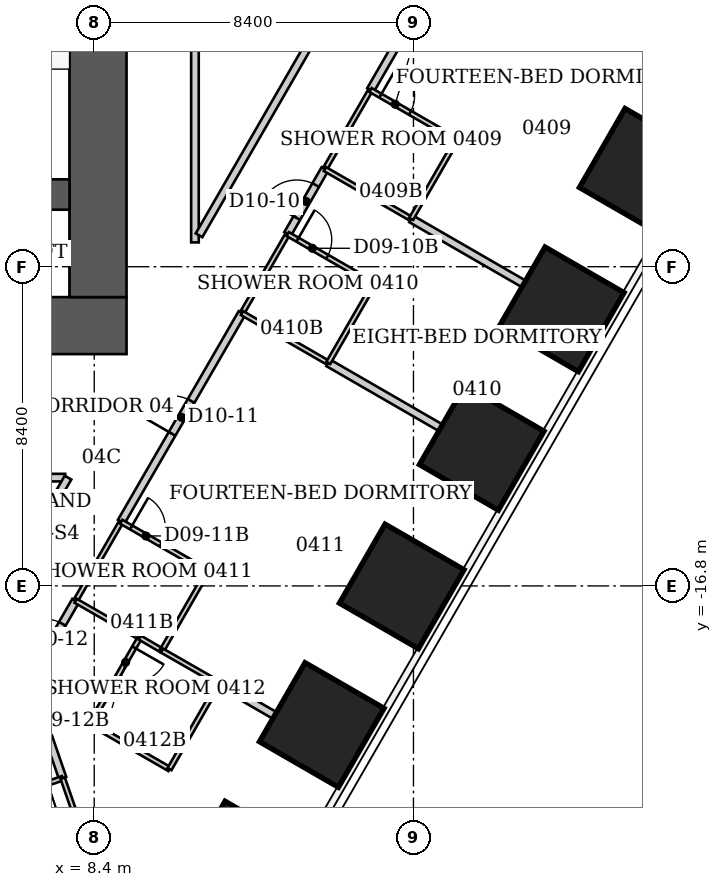
"""IFC4 building model, lengths in metres.
Left out: names, types, materials, properties, quantities, classifications, styles, units other than length and angle.
Written with IfcOpenShell. Run it as: python <this file> out.ifc"""

import sys

from ifc_helpers import new_model, si_unit, direction, frame, frame_2d, origin, origin_2d, place, context, subcontext, project, spatial, rectangle, extrude, element, fill, save


model = new_model("IFC4")
c1 = context("Model", 3, precision=1e-05, world=origin(), true_north=direction((0.0, 1.0)))
c2 = subcontext(c1, "Body", "Model", "MODEL_VIEW")
j1 = project(units=[si_unit("LENGTHUNIT", "METRE"), si_unit("PLANEANGLEUNIT", "RADIAN")], contexts=[c1])
p1 = place(None, origin())
s1 = spatial("IfcSite", under=j1, at=p1, CompositionType="ELEMENT")
p2 = place(p1, origin())
s2 = spatial("IfcBuilding", under=s1, at=p2, CompositionType="ELEMENT")
p3 = place(p2, frame((0.0, 0.0, 23.0)))
s3 = spatial("IfcBuildingStorey", under=s2, at=p3, CompositionType="ELEMENT", Elevation=23.0)
for number, where, z_axis, x_axis in (
    (1, (22.806, -5.875, 0.0), (0.0, 0.0, 1.0), (0.866, -0.5, 0.0)),
    (2, (20.701, -9.521, 0.0), (0.0, 0.0, 1.0), (0.866, -0.5, 0.0)),
    (3, (18.596, -13.167, 0.0), (0.0, 0.0, 1.0), (0.866, -0.5, 0.0)),
    (4, (16.491, -16.813, 0.0), (0.0, 0.0, 1.0), (0.866, -0.5, 0.0)),
    (5, (14.387, -20.459, 0.0), (0.0, 0.0, 1.0), (0.866, -0.5, 0.0)),
    (6, (12.282, -24.105, 0.0), (0.0, 0.0, 1.0), (0.866, -0.5, 0.0)),
):
    element("IfcColumn", number, at=place(p3, frame(where, z_axis=z_axis, x_axis=x_axis)), inside=s3, PredefinedType="COLUMN", context=c2, shape_type="SweptSolid", body=[
        extrude(rectangle(XDim=2.4, YDim=2.4, at=origin_2d()), origin(), (0.0, 0.0, 1.0), 3.8),
    ])
p4 = place(p3, frame((-9.25, -9.95, 0.0), z_axis=(0.0, 0.0, 1.0), x_axis=(1.0, 0.0, 0.0)))
e7 = element("IfcWall", 7, at=p4, inside=s3, PredefinedType="SHEAR", context=c2, shape_type="SweptSolid", body=[
    extrude(rectangle(XDim=18.5, YDim=1.5, at=frame_2d((9.25, 0.0))), origin(), (0.0, 0.0, 1.0), 3.8),
])
p5 = place(p4, frame((2.137, 0.0, 0.0)))
e8 = element("IfcOpeningElement", 8, at=p5, cuts=e7, PredefinedType="OPENING", context=c2, shape_type="SweptSolid", body=[
    extrude(rectangle(XDim=1.1, YDim=2.1, at=frame_2d((0.55, 1.05))), frame((0.0, 0.75, 0.0), z_axis=(0.0, -1.0, 0.0), x_axis=(1.0, 0.0, 0.0)), (0.0, 0.0, 1.0), 1.5),
])
p6 = place(p4, frame((4.762, 0.0, 0.0)))
e9 = element("IfcOpeningElement", 9, at=p6, cuts=e7, PredefinedType="OPENING", context=c2, shape_type="SweptSolid", body=[
    extrude(rectangle(XDim=1.1, YDim=2.1, at=frame_2d((0.55, 1.05))), frame((0.0, 0.75, 0.0), z_axis=(0.0, -1.0, 0.0), x_axis=(1.0, 0.0, 0.0)), (0.0, 0.0, 1.0), 1.5),
])
p7 = place(p4, frame((7.387, 0.0, 0.0)))
e10 = element("IfcOpeningElement", 10, at=p7, cuts=e7, PredefinedType="OPENING", context=c2, shape_type="SweptSolid", body=[
    extrude(rectangle(XDim=1.1, YDim=2.1, at=frame_2d((0.55, 1.05))), frame((0.0, 0.75, 0.0), z_axis=(0.0, -1.0, 0.0), x_axis=(1.0, 0.0, 0.0)), (0.0, 0.0, 1.0), 1.5),
])
p8 = place(p3, frame((8.5, -9.2, 0.0), z_axis=(0.0, 0.0, 1.0), x_axis=(0.0, 1.0, 0.0)))
e11 = element("IfcWall", 11, at=p8, inside=s3, PredefinedType="SHEAR", context=c2, shape_type="SweptSolid", body=[
    extrude(rectangle(XDim=15.3, YDim=1.5, at=frame_2d((7.65, 0.0))), origin(), (0.0, 0.0, 1.0), 3.8),
])
p9 = place(p8, frame((10.7, 0.0, 0.0)))
e12 = element("IfcOpeningElement", 12, at=p9, cuts=e11, PredefinedType="OPENING", context=c2, shape_type="SweptSolid", body=[
    extrude(rectangle(XDim=1.2, YDim=2.2, at=frame_2d((0.6, 1.1))), frame((0.0, 0.75, 0.0), z_axis=(0.0, -1.0, 0.0), x_axis=(1.0, 0.0, 0.0)), (0.0, 0.0, 1.0), 1.5),
])
p10 = place(p3, frame((-7.75, -6.5, 0.0), z_axis=(0.0, 0.0, 1.0), x_axis=(1.0, 0.0, 0.0)))
e13 = element("IfcWall", 13, at=p10, inside=s3, PredefinedType="SHEAR", context=c2, shape_type="SweptSolid", body=[
    extrude(rectangle(XDim=15.5, YDim=0.8, at=frame_2d((7.75, 0.0))), origin(), (0.0, 0.0, 1.0), 3.8),
])
p11 = place(p3, frame((4.0, -13.95, 0.0), z_axis=(0.0, 0.0, 1.0), x_axis=(1.0, 0.0, 0.0)))
e14 = element("IfcWall", 14, at=p11, inside=s3, PredefinedType="PARTITIONING", context=c2, shape_type="SweptSolid", body=[
    extrude(rectangle(XDim=3.635, YDim=0.2, at=frame_2d((1.817, 0.0))), origin(), (0.0, 0.0, 1.0), 3.64),
])
p12 = place(p3, frame((6.71, -19.27, 0.0), z_axis=(0.0, 0.0, 1.0), x_axis=(0.499693115345, 0.866202511239, 0.0)))
e15 = element("IfcWall", 15, at=p12, inside=s3, PredefinedType="PARTITIONING", context=c2, shape_type="SweptSolid", body=[
    extrude(rectangle(XDim=2.401, YDim=0.2, at=frame_2d((1.201, 0.0))), origin(), (0.0, 0.0, 1.0), 3.64),
])
p13 = place(p12, frame((0.701, 0.0, 0.0)))
e16 = element("IfcOpeningElement", 16, at=p13, cuts=e15, PredefinedType="OPENING", context=c2, shape_type="SweptSolid", body=[
    extrude(rectangle(XDim=1.0, YDim=2.13, at=frame_2d((0.5, 1.065))), frame((0.0, 0.1, 0.0), z_axis=(0.0, -1.0, 0.0), x_axis=(1.0, 0.0, 0.0)), (0.0, 0.0, 1.0), 0.2),
])
p14 = place(p3, frame((6.726, -19.414, 0.0), z_axis=(0.0, 0.0, 1.0), x_axis=(0.326258175708, -0.945280700524, 0.0)))
e17 = element("IfcWall", 17, at=p14, inside=s3, PredefinedType="PARTITIONING", context=c2, shape_type="SweptSolid", body=[
    extrude(rectangle(XDim=2.588, YDim=0.2, at=frame_2d((1.294, 0.0))), origin(), (0.0, 0.0, 1.0), 3.64),
])
p15 = place(p3, frame((7.57, -21.86, 0.0), z_axis=(0.0, 0.0, 1.0), x_axis=(-0.944782191137, -0.327698964463, 0.0)))
e18 = element("IfcWall", 18, at=p15, inside=s3, PredefinedType="PARTITIONING", context=c2, shape_type="SweptSolid", body=[
    extrude(rectangle(XDim=2.594, YDim=0.12, at=frame_2d((1.297, 0.0))), origin(), (0.0, 0.0, 1.0), 3.64),
])
p16 = place(p3, frame((7.57, -21.86, 0.0), z_axis=(0.0, 0.0, 1.0), x_axis=(0.327706459026, -0.944779591605, 0.0)))
e19 = element("IfcWall", 19, at=p16, inside=s3, PredefinedType="PARTITIONING", context=c2, shape_type="SweptSolid", body=[
    extrude(rectangle(XDim=2.35, YDim=0.12, at=frame_2d((1.175, 0.0))), origin(), (0.0, 0.0, 1.0), 3.64),
])
p17 = place(p3, frame((7.71, -13.95, 0.0), z_axis=(0.0, 0.0, 1.0), x_axis=(-0.500511113963, -0.865730110831, 0.0)))
e20 = element("IfcWall", 20, at=p17, inside=s3, PredefinedType="PARTITIONING", context=c2, shape_type="SweptSolid", body=[
    extrude(rectangle(XDim=6.653, YDim=0.2, at=frame_2d((3.327, 0.0))), origin(), (0.0, 0.0, 1.0), 3.64),
])
p18 = place(p17, frame((2.777, 0.0, 0.0)))
e21 = element("IfcOpeningElement", 21, at=p18, cuts=e20, PredefinedType="OPENING", context=c2, shape_type="SweptSolid", body=[
    extrude(rectangle(XDim=1.1, YDim=2.2, at=frame_2d((0.55, 1.1))), frame((0.0, 0.1, 0.0), z_axis=(0.0, -1.0, 0.0), x_axis=(1.0, 0.0, 0.0)), (0.0, 0.0, 1.0), 0.2),
])
p19 = place(p3, frame((7.91, -17.19, 0.0), z_axis=(0.0, 0.0, 1.0), x_axis=(0.499737123639, 0.866177122335, 0.0)))
e22 = element("IfcWall", 22, at=p19, inside=s3, PredefinedType="PARTITIONING", context=c2, shape_type="SweptSolid", body=[
    extrude(rectangle(XDim=2.401, YDim=0.12, at=frame_2d((1.201, 0.0))), origin(), (0.0, 0.0, 1.0), 3.64),
])
p20 = place(p3, frame((7.91, -17.19, 0.0), z_axis=(0.0, 0.0, 1.0), x_axis=(0.8673242112, -0.497743621421, 0.0)))
e23 = element("IfcWall", 23, at=p20, inside=s3, PredefinedType="PARTITIONING", context=c2, shape_type="SweptSolid", body=[
    extrude(rectangle(XDim=1.949, YDim=0.12, at=frame_2d((0.974, 0.0))), origin(), (0.0, 0.0, 1.0), 3.64),
])
p21 = place(p3, frame((8.3, -20.42, 0.0), z_axis=(0.0, 0.0, 1.0), x_axis=(0.866177122335, -0.499737123639, 0.0)))
e24 = element("IfcWall", 24, at=p21, inside=s3, PredefinedType="PARTITIONING", context=c2, shape_type="SweptSolid", body=[
    extrude(rectangle(XDim=2.401, YDim=0.12, at=frame_2d((1.201, 0.0))), origin(), (0.0, 0.0, 1.0), 3.64),
])
p22 = place(p3, frame((9.11, -15.11, 0.0), z_axis=(0.0, 0.0, 1.0), x_axis=(0.500872436665, 0.86552111597, 0.0)))
e25 = element("IfcWall", 25, at=p22, inside=s3, PredefinedType="PARTITIONING", context=c2, shape_type="SweptSolid", body=[
    extrude(rectangle(XDim=6.344, YDim=0.2, at=frame_2d((3.172, 0.0))), origin(), (0.0, 0.0, 1.0), 3.64),
])
p23 = place(p22, frame((2.672, 0.0, 0.0)))
e26 = element("IfcOpeningElement", 26, at=p23, cuts=e25, PredefinedType="OPENING", context=c2, shape_type="SweptSolid", body=[
    extrude(rectangle(XDim=1.0, YDim=2.13, at=frame_2d((0.5, 1.065))), frame((0.0, 0.1, 0.0), z_axis=(0.0, -1.0, 0.0), x_axis=(1.0, 0.0, 0.0)), (0.0, 0.0, 1.0), 0.2),
])
p24 = place(p3, frame((9.6, -18.16, 0.0), z_axis=(0.0, 0.0, 1.0), x_axis=(-0.498627694264, -0.866816256489, 0.0)))
e27 = element("IfcWall", 27, at=p24, inside=s3, PredefinedType="PARTITIONING", context=c2, shape_type="SweptSolid", body=[
    extrude(rectangle(XDim=2.607, YDim=0.12, at=frame_2d((1.304, 0.0))), origin(), (0.0, 0.0, 1.0), 3.64),
])
p25 = place(p24, frame((0.3, 0.0, 0.0)))
e28 = element("IfcOpeningElement", 28, at=p25, cuts=e27, PredefinedType="OPENING", context=c2, shape_type="SweptSolid", body=[
    extrude(rectangle(XDim=0.9, YDim=2.03, at=frame_2d((0.45, 1.015))), frame((0.0, 0.06, 0.0), z_axis=(0.0, -1.0, 0.0), x_axis=(1.0, 0.0, 0.0)), (0.0, 0.0, 1.0), 0.12),
])
p26 = place(p3, frame((9.6, -18.16, 0.0), z_axis=(0.0, 0.0, 1.0), x_axis=(0.862577739272, -0.505924543497, 0.0)))
e29 = element("IfcWall", 29, at=p26, inside=s3, PredefinedType="PARTITIONING", context=c2, shape_type="SweptSolid", body=[
    extrude(rectangle(XDim=0.672, YDim=0.12, at=frame_2d((0.336, 0.0))), origin(), (0.0, 0.0, 1.0), 3.64),
])
p27 = place(p3, frame((10.18, -18.5, 0.0), z_axis=(0.0, 0.0, 1.0), x_axis=(0.499693115345, 0.866202511239, 0.0)))
e30 = element("IfcWall", 30, at=p27, inside=s3, PredefinedType="PARTITIONING", context=c2, shape_type="SweptSolid", body=[
    extrude(rectangle(XDim=2.401, YDim=0.12, at=frame_2d((1.201, 0.0))), origin(), (0.0, 0.0, 1.0), 3.64),
])
p28 = place(p3, frame((10.18, -18.5, 0.0), z_axis=(0.0, 0.0, 1.0), x_axis=(0.867564547129, -0.497324598794, 0.0)))
e31 = element("IfcWall", 31, at=p28, inside=s3, PredefinedType="PARTITIONING", context=c2, shape_type="SweptSolid", body=[
    extrude(rectangle(XDim=1.729, YDim=0.12, at=frame_2d((0.865, 0.0))), origin(), (0.0, 0.0, 1.0), 3.64),
])
p29 = place(p3, frame((10.38, -21.62, 0.0), z_axis=(0.0, 0.0, 1.0), x_axis=(0.498627694264, 0.866816256489, 0.0)))
e32 = element("IfcWall", 32, at=p29, inside=s3, PredefinedType="PARTITIONING", context=c2, shape_type="SweptSolid", body=[
    extrude(rectangle(XDim=2.607, YDim=0.12, at=frame_2d((1.304, 0.0))), origin(), (0.0, 0.0, 1.0), 3.64),
])
p30 = place(p3, frame((11.05, -7.76, 0.0), z_axis=(0.0, 0.0, 1.0), x_axis=(0.0, 1.0, 0.0)))
e33 = element("IfcWall", 33, at=p30, inside=s3, PredefinedType="PARTITIONING", context=c2, shape_type="SweptSolid", body=[
    extrude(rectangle(XDim=17.16, YDim=0.2, at=frame_2d((8.58, 0.0))), origin(), (0.0, 0.0, 1.0), 3.64),
])
p31 = place(p30, frame((8.03, 0.0, 0.0)))
e34 = element("IfcOpeningElement", 34, at=p31, cuts=e33, PredefinedType="OPENING", context=c2, shape_type="SweptSolid", body=[
    extrude(rectangle(XDim=1.1, YDim=2.2, at=frame_2d((0.55, 1.1))), frame((0.0, 0.1, 0.0), z_axis=(0.0, -1.0, 0.0), x_axis=(1.0, 0.0, 0.0)), (0.0, 0.0, 1.0), 0.2),
])
p32 = place(p3, frame((11.38, -16.42, 0.0), z_axis=(0.0, 0.0, 1.0), x_axis=(-0.866154567199, 0.49977621564, 0.0)))
e35 = element("IfcWall", 35, at=p32, inside=s3, PredefinedType="PARTITIONING", context=c2, shape_type="SweptSolid", body=[
    extrude(rectangle(XDim=2.621, YDim=0.12, at=frame_2d((1.311, 0.0))), origin(), (0.0, 0.0, 1.0), 2.878),
])
p33 = place(p32, frame((1.421, 0.0, 0.0)))
e36 = element("IfcOpeningElement", 36, at=p33, cuts=e35, PredefinedType="OPENING", context=c2, shape_type="SweptSolid", body=[
    extrude(rectangle(XDim=0.9, YDim=2.03, at=frame_2d((0.45, 1.015))), frame((0.0, 0.06, 0.0), z_axis=(0.0, -1.0, 0.0), x_axis=(1.0, 0.0, 0.0)), (0.0, 0.0, 1.0), 0.12),
])
p34 = place(p3, frame((11.68, -19.36, 0.0), z_axis=(0.0, 0.0, 1.0), x_axis=(0.865885444553, -0.500242338183, 0.0)))
e37 = element("IfcWall", 37, at=p34, inside=s3, PredefinedType="PARTITIONING", context=c2, shape_type="SweptSolid", body=[
    extrude(rectangle(XDim=4.038, YDim=0.2, at=frame_2d((2.019, 0.0))), origin(), (0.0, 0.0, 1.0), 3.64),
])
p35 = place(p3, frame((12.29, -9.62, 0.0), z_axis=(0.0, 0.0, 1.0), x_axis=(0.499693115345, 0.866202511239, 0.0)))
e38 = element("IfcWall", 38, at=p35, inside=s3, PredefinedType="PARTITIONING", context=c2, shape_type="SweptSolid", body=[
    extrude(rectangle(XDim=2.401, YDim=0.12, at=frame_2d((1.201, 0.0))), origin(), (0.0, 0.0, 1.0), 3.64),
])
p36 = place(p3, frame((12.29, -9.62, 0.0), z_axis=(0.0, 0.0, 1.0), x_axis=(0.865987003449, -0.500066505434, 0.0)))
e39 = element("IfcWall", 39, at=p36, inside=s3, PredefinedType="PARTITIONING", context=c2, shape_type="SweptSolid", body=[
    extrude(rectangle(XDim=2.621, YDim=0.12, at=frame_2d((1.311, 0.0))), origin(), (0.0, 0.0, 1.0), 3.038),
])
p37 = place(p3, frame((13.489, -7.539, 0.0), z_axis=(0.0, 0.0, 1.0), x_axis=(0.4978588916, 0.867258049288, 0.0)))
e40 = element("IfcWall", 40, at=p37, inside=s3, PredefinedType="PARTITIONING", context=c2, shape_type="SweptSolid", body=[
    extrude(rectangle(XDim=1.971, YDim=0.2, at=frame_2d((0.985, 0.0))), origin(), (0.0, 0.0, 1.0), 3.64),
])
p38 = place(p37, frame((0.486, 0.0, 0.0)))
e41 = element("IfcOpeningElement", 41, at=p38, cuts=e40, PredefinedType="OPENING", context=c2, shape_type="SweptSolid", body=[
    extrude(rectangle(XDim=1.0, YDim=2.13, at=frame_2d((0.5, 1.065))), frame((0.0, 0.1, 0.0), z_axis=(0.0, -1.0, 0.0), x_axis=(1.0, 0.0, 0.0)), (0.0, 0.0, 1.0), 0.2),
])
p39 = place(p3, frame((14.47, -5.83, 0.0), z_axis=(0.0, 0.0, 1.0), x_axis=(0.499693115345, 0.866202511239, 0.0)))
e42 = element("IfcWall", 42, at=p39, inside=s3, PredefinedType="PARTITIONING", context=c2, shape_type="SweptSolid", body=[
    extrude(rectangle(XDim=2.401, YDim=0.12, at=frame_2d((1.201, 0.0))), origin(), (0.0, 0.0, 1.0), 3.64),
])
p40 = place(p3, frame((14.47, -5.83, 0.0), z_axis=(0.0, 0.0, 1.0), x_axis=(0.866010296064, -0.500026166427, 0.0)))
e43 = element("IfcWall", 43, at=p40, inside=s3, PredefinedType="PARTITIONING", context=c2, shape_type="SweptSolid", body=[
    extrude(rectangle(XDim=2.621, YDim=0.12, at=frame_2d((1.311, 0.0))), origin(), (0.0, 0.0, 1.0), 3.023),
])
p41 = place(p3, frame((14.56, -10.931, 0.0), z_axis=(0.0, 0.0, 1.0), x_axis=(0.865995646508, -0.500051537573, 0.0)))
e44 = element("IfcWall", 44, at=p41, inside=s3, PredefinedType="PARTITIONING", context=c2, shape_type="SweptSolid", body=[
    extrude(rectangle(XDim=5.758, YDim=0.2, at=frame_2d((2.879, 0.0))), origin(), (0.0, 0.0, 1.0), 3.038),
])
p42 = place(p3, frame((14.56, -10.93, 0.0), z_axis=(0.0, 0.0, 1.0), x_axis=(0.499737123639, 0.866177122335, 0.0)))
e45 = element("IfcWall", 45, at=p42, inside=s3, PredefinedType="PARTITIONING", context=c2, shape_type="SweptSolid", body=[
    extrude(rectangle(XDim=2.401, YDim=0.12, at=frame_2d((1.201, 0.0))), origin(), (0.0, 0.0, 1.0), 3.64),
])
p43 = place(p3, frame((15.67, -3.75, 0.0), z_axis=(0.0, 0.0, 1.0), x_axis=(0.500061360627, 0.865989974311, 0.0)))
e46 = element("IfcWall", 46, at=p43, inside=s3, PredefinedType="PARTITIONING", context=c2, shape_type="SweptSolid", body=[
    extrude(rectangle(XDim=6.34, YDim=0.2, at=frame_2d((3.17, 0.0))), origin(), (0.0, 0.0, 1.0), 3.64),
])
p44 = place(p43, frame((2.67, 0.0, 0.0)))
e47 = element("IfcOpeningElement", 47, at=p44, cuts=e46, PredefinedType="OPENING", context=c2, shape_type="SweptSolid", body=[
    extrude(rectangle(XDim=1.0, YDim=2.13, at=frame_2d((0.5, 1.065))), frame((0.0, 0.1, 0.0), z_axis=(0.0, -1.0, 0.0), x_axis=(1.0, 0.0, 0.0)), (0.0, 0.0, 1.0), 0.2),
])
p45 = place(p3, frame((15.76, -8.85, 0.0), z_axis=(0.0, 0.0, 1.0), x_axis=(-0.866114241029, 0.499846097802, 0.0)))
e48 = element("IfcWall", 48, at=p45, inside=s3, PredefinedType="PARTITIONING", context=c2, shape_type="SweptSolid", body=[
    extrude(rectangle(XDim=2.621, YDim=0.12, at=frame_2d((1.311, 0.0))), origin(), (0.0, 0.0, 1.0), 3.64),
])
p46 = place(p45, frame((1.421, 0.0, 0.0)))
e49 = element("IfcOpeningElement", 49, at=p46, cuts=e48, PredefinedType="OPENING", context=c2, shape_type="SweptSolid", body=[
    extrude(rectangle(XDim=0.9, YDim=2.03, at=frame_2d((0.45, 1.015))), frame((0.0, 0.06, 0.0), z_axis=(0.0, -1.0, 0.0), x_axis=(1.0, 0.0, 0.0)), (0.0, 0.0, 1.0), 0.12),
])
p47 = place(p3, frame((16.74, -7.141, 0.0), z_axis=(0.0, 0.0, 1.0), x_axis=(0.865985044037, -0.500069898618, 0.0)))
e50 = element("IfcWall", 50, at=p47, inside=s3, PredefinedType="PARTITIONING", context=c2, shape_type="SweptSolid", body=[
    extrude(rectangle(XDim=5.758, YDim=0.2, at=frame_2d((2.879, 0.0))), origin(), (0.0, 0.0, 1.0), 3.023),
])
p48 = place(p3, frame((16.74, -7.14, 0.0), z_axis=(0.0, 0.0, 1.0), x_axis=(0.499737123639, 0.866177122335, 0.0)))
e51 = element("IfcWall", 51, at=p48, inside=s3, PredefinedType="PARTITIONING", context=c2, shape_type="SweptSolid", body=[
    extrude(rectangle(XDim=2.401, YDim=0.12, at=frame_2d((1.201, 0.0))), origin(), (0.0, 0.0, 1.0), 3.64),
])
p49 = place(p3, frame((17.87, 4.06, 0.0), z_axis=(0.0, 0.0, 1.0), x_axis=(-0.499769659837, -0.866158349903, 0.0)))
e52 = element("IfcWall", 52, at=p49, inside=s3, PredefinedType="PARTITIONING", context=c2, shape_type="SweptSolid", body=[
    extrude(rectangle(XDim=13.431, YDim=0.2, at=frame_2d((6.716, 0.0))), origin(), (0.0, 0.0, 1.0), 3.64),
])
p50 = place(p3, frame((17.94, -5.06, 0.0), z_axis=(0.0, 0.0, 1.0), x_axis=(-0.866114241029, 0.499846097802, 0.0)))
e53 = element("IfcWall", 53, at=p50, inside=s3, PredefinedType="PARTITIONING", context=c2, shape_type="SweptSolid", body=[
    extrude(rectangle(XDim=2.621, YDim=0.12, at=frame_2d((1.311, 0.0))), origin(), (0.0, 0.0, 1.0), 3.64),
])
p51 = place(p50, frame((1.421, 0.0, 0.0)))
e54 = element("IfcOpeningElement", 54, at=p51, cuts=e53, PredefinedType="OPENING", context=c2, shape_type="SweptSolid", body=[
    extrude(rectangle(XDim=0.9, YDim=2.03, at=frame_2d((0.45, 1.015))), frame((0.0, 0.06, 0.0), z_axis=(0.0, -1.0, 0.0), x_axis=(1.0, 0.0, 0.0)), (0.0, 0.0, 1.0), 0.12),
])
p52 = place(p51, origin())
e55 = element("IfcDoor", 55, at=p52, inside=s3, OperationType="SINGLE_SWING_RIGHT", PredefinedType="DOOR", context=c2, shape_type="SweptSolid", body=[
    extrude(rectangle(XDim=0.9, YDim=2.03, at=frame_2d((0.45, 1.015))), frame((0.0, 0.025, 0.0), z_axis=(0.0, -1.0, 0.0), x_axis=(1.0, 0.0, 0.0)), (0.0, 0.0, 1.0), 0.05),
])
fill(e54, e55)
p53 = place(p38, origin())
e56 = element("IfcDoor", 56, at=p53, inside=s3, OperationType="SINGLE_SWING_LEFT", PredefinedType="DOOR", context=c2, shape_type="SweptSolid", body=[
    extrude(rectangle(XDim=1.0, YDim=2.13, at=frame_2d((0.5, 1.065))), frame((0.0, 0.025, 0.0), z_axis=(0.0, -1.0, 0.0), x_axis=(1.0, 0.0, 0.0)), (0.0, 0.0, 1.0), 0.05),
])
fill(e41, e56)
p54 = place(p46, origin())
e57 = element("IfcDoor", 57, at=p54, inside=s3, OperationType="SINGLE_SWING_RIGHT", PredefinedType="DOOR", context=c2, shape_type="SweptSolid", body=[
    extrude(rectangle(XDim=0.9, YDim=2.03, at=frame_2d((0.45, 1.015))), frame((0.0, 0.025, 0.0), z_axis=(0.0, -1.0, 0.0), x_axis=(1.0, 0.0, 0.0)), (0.0, 0.0, 1.0), 0.05),
])
fill(e49, e57)
p55 = place(p23, origin())
e58 = element("IfcDoor", 58, at=p55, inside=s3, OperationType="SINGLE_SWING_LEFT", PredefinedType="DOOR", context=c2, shape_type="SweptSolid", body=[
    extrude(rectangle(XDim=1.0, YDim=2.13, at=frame_2d((0.5, 1.065))), frame((0.0, 0.025, 0.0), z_axis=(0.0, -1.0, 0.0), x_axis=(1.0, 0.0, 0.0)), (0.0, 0.0, 1.0), 0.05),
])
fill(e26, e58)
p56 = place(p33, origin())
e59 = element("IfcDoor", 59, at=p56, inside=s3, OperationType="SINGLE_SWING_RIGHT", PredefinedType="DOOR", context=c2, shape_type="SweptSolid", body=[
    extrude(rectangle(XDim=0.9, YDim=2.03, at=frame_2d((0.45, 1.015))), frame((0.0, 0.025, 0.0), z_axis=(0.0, -1.0, 0.0), x_axis=(1.0, 0.0, 0.0)), (0.0, 0.0, 1.0), 0.05),
])
fill(e36, e59)
p57 = place(p13, origin())
e60 = element("IfcDoor", 60, at=p57, inside=s3, OperationType="SINGLE_SWING_LEFT", PredefinedType="DOOR", context=c2, shape_type="SweptSolid", body=[
    extrude(rectangle(XDim=1.0, YDim=2.13, at=frame_2d((0.5, 1.065))), frame((0.0, 0.025, 0.0), z_axis=(0.0, -1.0, 0.0), x_axis=(1.0, 0.0, 0.0)), (0.0, 0.0, 1.0), 0.05),
])
fill(e16, e60)
p58 = place(p25, origin())
e61 = element("IfcDoor", 61, at=p58, inside=s3, OperationType="SINGLE_SWING_LEFT", PredefinedType="DOOR", context=c2, shape_type="SweptSolid", body=[
    extrude(rectangle(XDim=0.9, YDim=2.03, at=frame_2d((0.45, 1.015))), frame((0.0, 0.025, 0.0), z_axis=(0.0, -1.0, 0.0), x_axis=(1.0, 0.0, 0.0)), (0.0, 0.0, 1.0), 0.05),
])
fill(e28, e61)
save(model, sys.argv[1])
